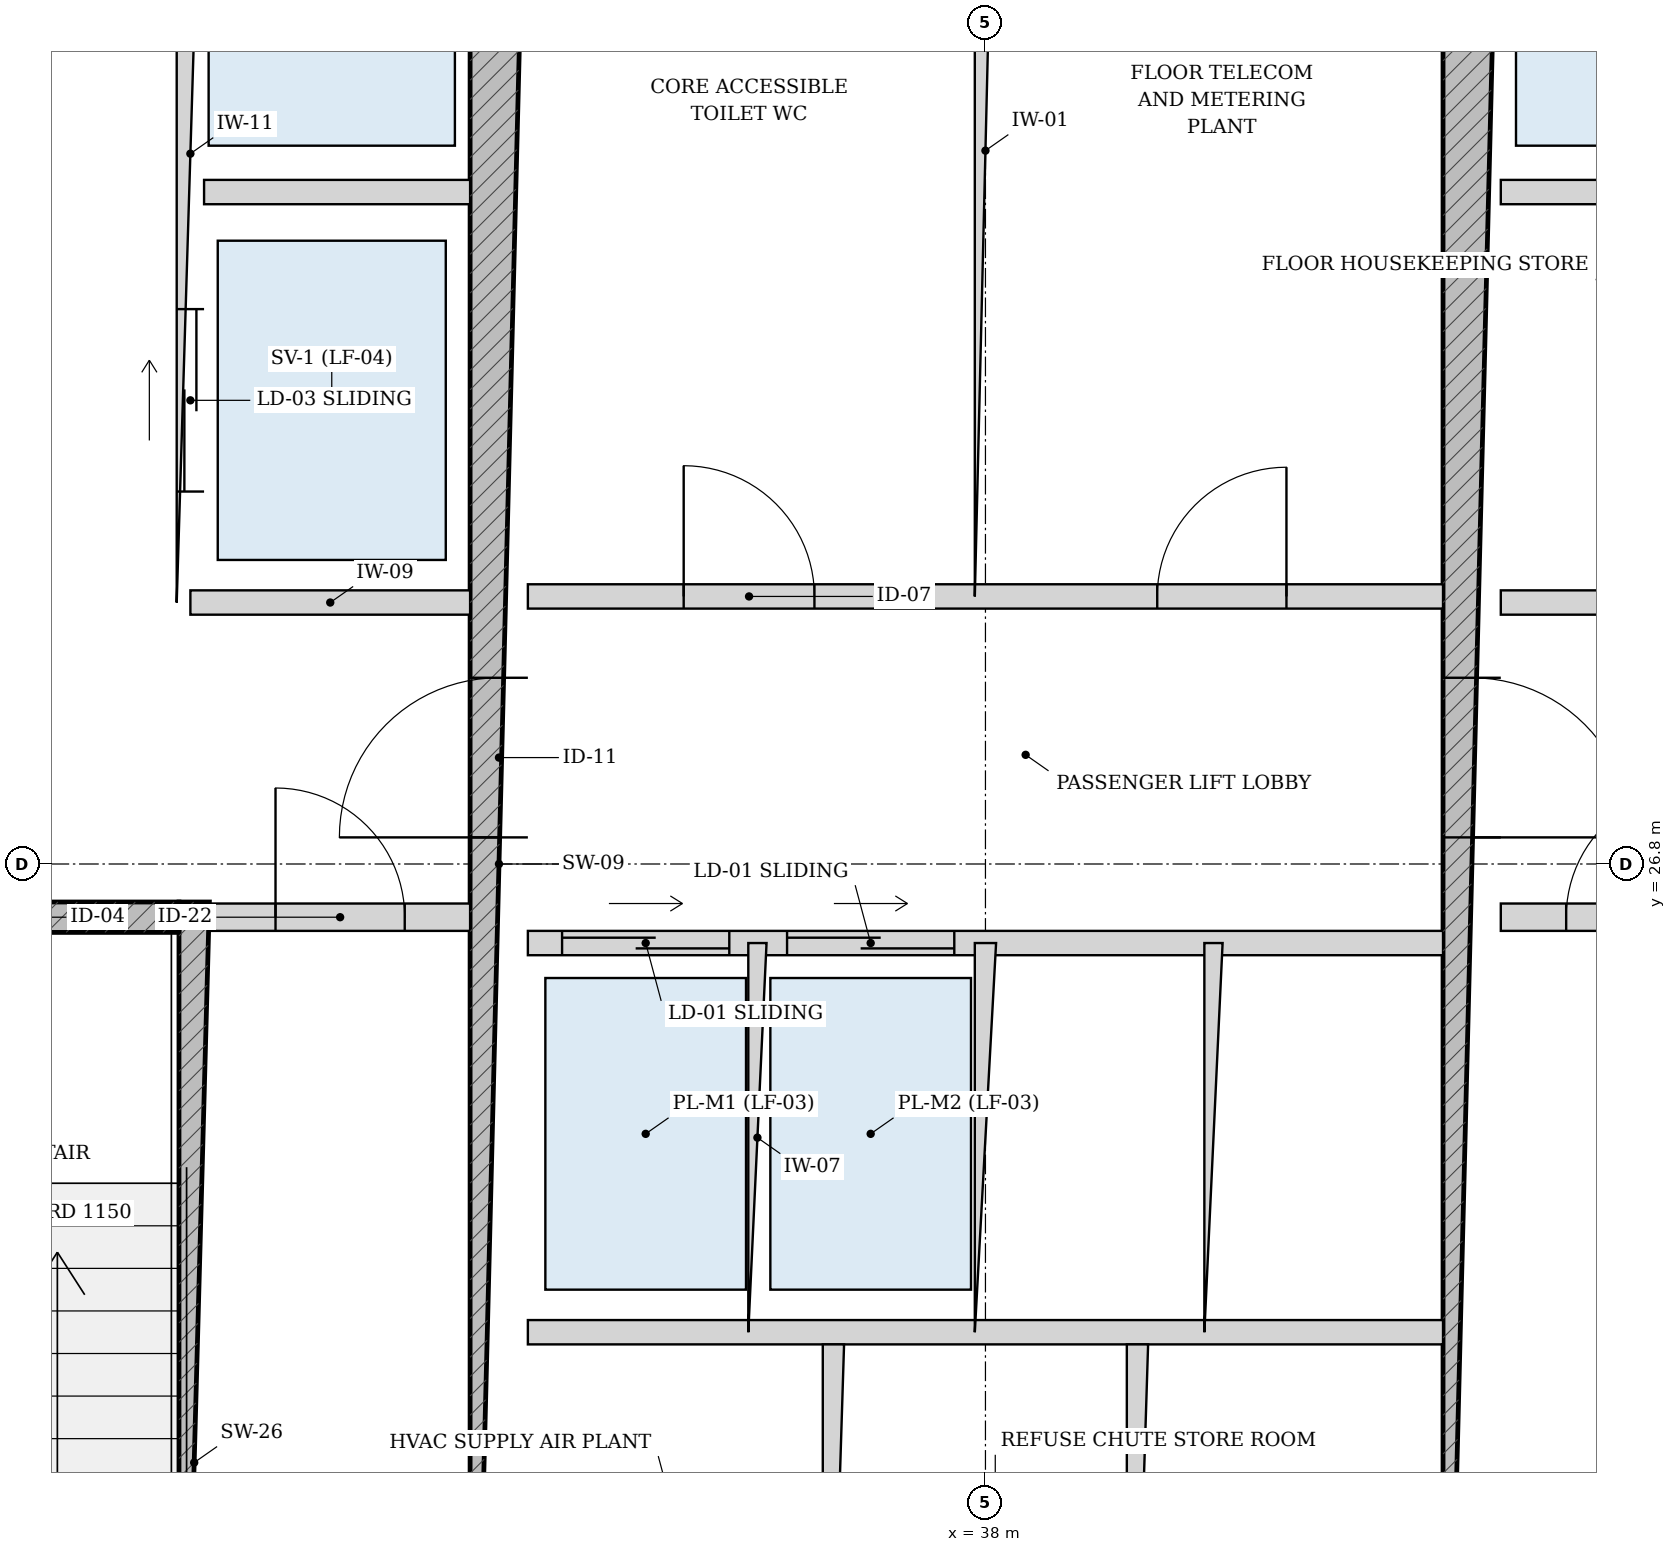
"""IFC4 building model, lengths in metres.
Left out: names, types, materials, properties, quantities, classifications, styles, units other than length and angle.
Written with IfcOpenShell. Run it as: python <this file> out.ifc"""

import sys

from ifc_helpers import new_model, si_unit, direction, frame, frame_2d, origin, place, context, subcontext, project, spatial, rectangle, extrude, source, transform, mapped, element, fill, save


model = new_model("IFC4")
c1 = context("Model", 3, precision=1e-05, world=origin(), true_north=direction((-0.2419218956, 0.970295726276)))
c2 = subcontext(c1, "Body", "Model", "MODEL_VIEW")
j1 = project(units=[si_unit("LENGTHUNIT", "METRE"), si_unit("PLANEANGLEUNIT", "RADIAN")], contexts=[c1])
p1 = place(None, origin())
s1 = spatial("IfcSite", under=j1, at=p1, CompositionType="ELEMENT")
p2 = place(p1, origin())
s2 = spatial("IfcBuilding", under=s1, at=p2, CompositionType="ELEMENT")
p3 = place(p2, frame((0.0, 0.0, 202.3)))
s3 = spatial("IfcBuildingStorey", under=s2, at=p3, CompositionType="ELEMENT", Elevation=202.3)
p4 = place(p3, frame((32.795, 19.175, 0.0), z_axis=(0.0, 0.0, 1.0), x_axis=(0.0, 1.0, 0.0)))
e1 = element("IfcWall", 1, at=p4, inside=s3, PredefinedType="SOLIDWALL", context=c2, shape_type="SweptSolid", body=[
    extrude(rectangle(XDim=7.375, YDim=0.2, at=frame_2d((3.688, 0.0))), origin(), (0.0, 0.0, 1.0), 3.435),
])
p5 = place(p3, frame((29.375, 26.45, 0.0), z_axis=(0.0, 0.0, 1.0), x_axis=(1.0, 0.0, 0.0)))
e2 = element("IfcWall", 2, at=p5, inside=s3, PredefinedType="SOLIDWALL", context=c2, shape_type="SweptSolid", body=[
    extrude(rectangle(XDim=3.32, YDim=0.2, at=frame_2d((1.66, 0.0))), origin(), (0.0, 0.0, 1.0), 3.435),
])
p6 = place(p5, frame((1.185, 0.0, 0.0)))
e3 = element("IfcOpeningElement", 3, at=p6, cuts=e2, PredefinedType="OPENING", context=c2, shape_type="SweptSolid", body=[
    extrude(rectangle(XDim=0.95, YDim=2.15, at=frame_2d((0.475, 1.075))), frame((0.0, 0.11, 0.0), z_axis=(0.0, -1.0, 0.0), x_axis=(1.0, 0.0, 0.0)), (0.0, 0.0, 1.0), 0.22),
])
p7 = place(p3, frame((34.8, 19.175, 0.0), z_axis=(0.0, 0.0, 1.0), x_axis=(0.0, 1.0, 0.0)))
e4 = element("IfcWall", 4, at=p7, inside=s3, PredefinedType="SHEAR", context=c2, shape_type="SweptSolid", body=[
    extrude(rectangle(XDim=15.25, YDim=0.38, at=frame_2d((7.625, 0.0))), origin(), (0.0, 0.0, 1.0), 3.435),
])
p8 = place(p7, frame((7.8, 0.0, 0.0)))
e5 = element("IfcOpeningElement", 5, at=p8, cuts=e4, PredefinedType="OPENING", context=c2, shape_type="SweptSolid", body=[
    extrude(rectangle(XDim=1.05, YDim=2.15, at=frame_2d((0.525, 1.075))), frame((0.0, 0.2, 0.0), z_axis=(0.0, -1.0, 0.0), x_axis=(1.0, 0.0, 0.0)), (0.0, 0.0, 1.0), 0.4),
])
p9 = place(p3, frame((41.2, 19.175, 0.0), z_axis=(0.0, 0.0, 1.0), x_axis=(0.0, 1.0, 0.0)))
e6 = element("IfcWall", 6, at=p9, inside=s3, PredefinedType="SHEAR", context=c2, shape_type="SweptSolid", body=[
    extrude(rectangle(XDim=15.25, YDim=0.38, at=frame_2d((7.625, 0.0))), origin(), (0.0, 0.0, 1.0), 3.435),
])
p10 = place(p9, frame((7.8, 0.0, 0.0)))
e7 = element("IfcOpeningElement", 7, at=p10, cuts=e6, PredefinedType="OPENING", context=c2, shape_type="SweptSolid", body=[
    extrude(rectangle(XDim=1.05, YDim=2.15, at=frame_2d((0.525, 1.075))), frame((0.0, 0.2, 0.0), z_axis=(0.0, -1.0, 0.0), x_axis=(1.0, 0.0, 0.0)), (0.0, 0.0, 1.0), 0.4),
])
p11 = place(p3, frame((32.9, 26.45, 0.0), z_axis=(0.0, 0.0, 1.0), x_axis=(1.0, 0.0, 0.0)))
e8 = element("IfcWall", 8, at=p11, inside=s3, PredefinedType="PARTITIONING", context=c2, shape_type="SweptSolid", body=[
    extrude(rectangle(XDim=1.71, YDim=0.18, at=frame_2d((0.855, 0.0))), origin(), (0.0, 0.0, 1.0), 3.435),
])
p12 = place(p11, frame((0.43, 0.0, 0.0)))
e9 = element("IfcOpeningElement", 9, at=p12, cuts=e8, PredefinedType="OPENING", context=c2, shape_type="SweptSolid", body=[
    extrude(rectangle(XDim=0.85, YDim=2.1, at=frame_2d((0.425, 1.05))), frame((0.0, 0.1, 0.0), z_axis=(0.0, -1.0, 0.0), x_axis=(1.0, 0.0, 0.0)), (0.0, 0.0, 1.0), 0.2),
])
p13 = place(p3, frame((41.39, 26.45, 0.0), z_axis=(0.0, 0.0, 1.0), x_axis=(1.0, 0.0, 0.0)))
e10 = element("IfcWall", 10, at=p13, inside=s3, PredefinedType="PARTITIONING", context=c2, shape_type="SweptSolid", body=[
    extrude(rectangle(XDim=1.71, YDim=0.18, at=frame_2d((0.855, 0.0))), origin(), (0.0, 0.0, 1.0), 3.435),
])
p14 = place(p13, frame((0.43, 0.0, 0.0)))
e11 = element("IfcOpeningElement", 11, at=p14, cuts=e10, PredefinedType="OPENING", context=c2, shape_type="SweptSolid", body=[
    extrude(rectangle(XDim=0.85, YDim=2.1, at=frame_2d((0.425, 1.05))), frame((0.0, 0.1, 0.0), z_axis=(0.0, -1.0, 0.0), x_axis=(1.0, 0.0, 0.0)), (0.0, 0.0, 1.0), 0.2),
])
p15 = place(p3, frame((32.77, 28.52, 0.0), z_axis=(0.0, 0.0, 1.0), x_axis=(0.0, 1.0, 0.0)))
e12 = element("IfcWall", 12, at=p15, inside=s3, PredefinedType="PARTITIONING", context=c2, shape_type="SweptSolid", body=[
    extrude(rectangle(XDim=5.905, YDim=0.18, at=frame_2d((2.953, 0.0))), origin(), (0.0, 0.0, 1.0), 3.435),
])
p16 = place(p15, frame((3.655, 0.0, 0.0)))
e13 = element("IfcOpeningElement", 13, at=p16, cuts=e12, PredefinedType="OPENING", context=c2, shape_type="SweptSolid", body=[
    extrude(rectangle(XDim=1.15, YDim=2.2, at=frame_2d((0.575, 1.1))), frame((0.0, 0.1, 0.0), z_axis=(0.0, -1.0, 0.0), x_axis=(1.0, 0.0, 0.0)), (0.0, 0.0, 1.0), 0.2),
])
p17 = place(p15, frame((0.73, 0.0, 0.0)))
e14 = element("IfcOpeningElement", 14, at=p17, cuts=e12, PredefinedType="OPENING", context=c2, shape_type="SweptSolid", body=[
    extrude(rectangle(XDim=1.2, YDim=2.25, at=frame_2d((0.6, 1.125))), frame((0.0, 0.1, 0.0), z_axis=(0.0, -1.0, 0.0), x_axis=(1.0, 0.0, 0.0)), (0.0, 0.0, 1.0), 0.2),
])
p18 = place(p3, frame((32.86, 31.22, 0.0), z_axis=(0.0, 0.0, 1.0), x_axis=(1.0, 0.0, 0.0)))
e15 = element("IfcWall", 15, at=p18, inside=s3, PredefinedType="PARTITIONING", context=c2, shape_type="SweptSolid", body=[
    extrude(rectangle(XDim=1.75, YDim=0.16, at=frame_2d((0.875, 0.0))), origin(), (0.0, 0.0, 1.0), 3.435),
])
p19 = place(p3, frame((32.77, 28.52, 0.0), z_axis=(0.0, 0.0, 1.0), x_axis=(1.0, 0.0, 0.0)))
e16 = element("IfcWall", 16, at=p19, inside=s3, PredefinedType="PARTITIONING", context=c2, shape_type="SweptSolid", body=[
    extrude(rectangle(XDim=1.84, YDim=0.16, at=frame_2d((0.92, 0.0))), origin(), (0.0, 0.0, 1.0), 3.435),
])
p20 = place(p3, frame((41.39, 31.22, 0.0), z_axis=(0.0, 0.0, 1.0), x_axis=(1.0, 0.0, 0.0)))
e17 = element("IfcWall", 17, at=p20, inside=s3, PredefinedType="PARTITIONING", context=c2, shape_type="SweptSolid", body=[
    extrude(rectangle(XDim=1.75, YDim=0.16, at=frame_2d((0.875, 0.0))), origin(), (0.0, 0.0, 1.0), 3.435),
])
p21 = place(p3, frame((41.39, 28.52, 0.0), z_axis=(0.0, 0.0, 1.0), x_axis=(1.0, 0.0, 0.0)))
e18 = element("IfcWall", 18, at=p21, inside=s3, PredefinedType="PARTITIONING", context=c2, shape_type="SweptSolid", body=[
    extrude(rectangle(XDim=1.84, YDim=0.16, at=frame_2d((0.92, 0.0))), origin(), (0.0, 0.0, 1.0), 3.435),
])
p22 = place(p3, frame((34.99, 28.56, 0.0), z_axis=(0.0, 0.0, 1.0), x_axis=(1.0, 0.0, 0.0)))
e19 = element("IfcWall", 19, at=p22, inside=s3, PredefinedType="PARTITIONING", context=c2, shape_type="SweptSolid", body=[
    extrude(rectangle(XDim=6.02, YDim=0.16, at=frame_2d((3.01, 0.0))), origin(), (0.0, 0.0, 1.0), 3.435),
])
p23 = place(p22, frame((1.025, 0.0, 0.0)))
e20 = element("IfcOpeningElement", 20, at=p23, cuts=e19, PredefinedType="OPENING", context=c2, shape_type="SweptSolid", body=[
    extrude(rectangle(XDim=0.86, YDim=2.1, at=frame_2d((0.43, 1.05))), frame((0.0, 0.09, 0.0), z_axis=(0.0, -1.0, 0.0), x_axis=(1.0, 0.0, 0.0)), (0.0, 0.0, 1.0), 0.18),
])
p24 = place(p22, frame((4.14, 0.0, 0.0)))
e21 = element("IfcOpeningElement", 21, at=p24, cuts=e19, PredefinedType="OPENING", context=c2, shape_type="SweptSolid", body=[
    extrude(rectangle(XDim=0.85, YDim=2.1, at=frame_2d((0.425, 1.05))), frame((0.0, 0.09, 0.0), z_axis=(0.0, -1.0, 0.0), x_axis=(1.0, 0.0, 0.0)), (0.0, 0.0, 1.0), 0.18),
])
p25 = place(p3, frame((38.0, 28.56, 0.0), z_axis=(0.0, 0.0, 1.0), x_axis=(0.0, 1.0, 0.0)))
e22 = element("IfcWall", 22, at=p25, inside=s3, PredefinedType="PARTITIONING", context=c2, shape_type="SweptSolid", body=[
    extrude(rectangle(XDim=5.865, YDim=0.14, at=frame_2d((2.933, 0.0))), origin(), (0.0, 0.0, 1.0), 3.435),
])
p26 = place(p3, frame((34.99, 26.28, 0.0), z_axis=(0.0, 0.0, 1.0), x_axis=(1.0, 0.0, 0.0)))
e23 = element("IfcWall", 23, at=p26, inside=s3, PredefinedType="PARTITIONING", context=c2, shape_type="SweptSolid", body=[
    extrude(rectangle(XDim=6.02, YDim=0.16, at=frame_2d((3.01, 0.0))), origin(), (0.0, 0.0, 1.0), 3.435),
])
p27 = place(p26, frame((0.225, 0.0, 0.0)))
e24 = element("IfcOpeningElement", 24, at=p27, cuts=e23, PredefinedType="OPENING", context=c2, shape_type="SweptSolid", body=[
    extrude(rectangle(XDim=1.1, YDim=2.2, at=frame_2d((0.55, 1.1))), frame((0.0, 0.09, 0.0), z_axis=(0.0, -1.0, 0.0), x_axis=(1.0, 0.0, 0.0)), (0.0, 0.0, 1.0), 0.18),
])
p28 = place(p26, frame((1.705, 0.0, 0.0)))
e25 = element("IfcOpeningElement", 25, at=p28, cuts=e23, PredefinedType="OPENING", context=c2, shape_type="SweptSolid", body=[
    extrude(rectangle(XDim=1.1, YDim=2.2, at=frame_2d((0.55, 1.1))), frame((0.0, 0.09, 0.0), z_axis=(0.0, -1.0, 0.0), x_axis=(1.0, 0.0, 0.0)), (0.0, 0.0, 1.0), 0.18),
])
p29 = place(p3, frame((34.99, 23.72, 0.0), z_axis=(0.0, 0.0, 1.0), x_axis=(1.0, 0.0, 0.0)))
e26 = element("IfcWall", 26, at=p29, inside=s3, PredefinedType="PARTITIONING", context=c2, shape_type="SweptSolid", body=[
    extrude(rectangle(XDim=6.02, YDim=0.16, at=frame_2d((3.01, 0.0))), origin(), (0.0, 0.0, 1.0), 3.435),
])
p30 = place(p3, frame((36.5, 23.72, 0.0), z_axis=(0.0, 0.0, 1.0), x_axis=(0.0, 1.0, 0.0)))
e27 = element("IfcWall", 27, at=p30, inside=s3, PredefinedType="PARTITIONING", context=c2, shape_type="SweptSolid", body=[
    extrude(rectangle(XDim=2.56, YDim=0.12, at=frame_2d((1.28, 0.0))), origin(), (0.0, 0.0, 1.0), 3.435),
])
p31 = place(p3, frame((38.0, 23.72, 0.0), z_axis=(0.0, 0.0, 1.0), x_axis=(0.0, 1.0, 0.0)))
e28 = element("IfcWall", 28, at=p31, inside=s3, PredefinedType="PARTITIONING", context=c2, shape_type="SweptSolid", body=[
    extrude(rectangle(XDim=2.56, YDim=0.14, at=frame_2d((1.28, 0.0))), origin(), (0.0, 0.0, 1.0), 3.435),
])
p32 = place(p3, frame((39.5, 23.72, 0.0), z_axis=(0.0, 0.0, 1.0), x_axis=(0.0, 1.0, 0.0)))
e29 = element("IfcWall", 29, at=p32, inside=s3, PredefinedType="PARTITIONING", context=c2, shape_type="SweptSolid", body=[
    extrude(rectangle(XDim=2.56, YDim=0.12, at=frame_2d((1.28, 0.0))), origin(), (0.0, 0.0, 1.0), 3.435),
])
p33 = place(p3, frame((37.0, 19.175, 0.0), z_axis=(0.0, 0.0, 1.0), x_axis=(0.0, 1.0, 0.0)))
e30 = element("IfcWall", 30, at=p33, inside=s3, PredefinedType="PARTITIONING", context=c2, shape_type="SweptSolid", body=[
    extrude(rectangle(XDim=4.465, YDim=0.14, at=frame_2d((2.232, 0.0))), origin(), (0.0, 0.0, 1.0), 3.435),
])
p34 = place(p33, frame((1.808, 0.0, 0.0)))
e31 = element("IfcOpeningElement", 31, at=p34, cuts=e30, PredefinedType="OPENING", context=c2, shape_type="SweptSolid", body=[
    extrude(rectangle(XDim=0.85, YDim=2.1, at=frame_2d((0.425, 1.05))), frame((0.0, 0.08, 0.0), z_axis=(0.0, -1.0, 0.0), x_axis=(1.0, 0.0, 0.0)), (0.0, 0.0, 1.0), 0.16),
])
p35 = place(p3, frame((39.0, 19.175, 0.0), z_axis=(0.0, 0.0, 1.0), x_axis=(0.0, 1.0, 0.0)))
e32 = element("IfcWall", 32, at=p35, inside=s3, PredefinedType="PARTITIONING", context=c2, shape_type="SweptSolid", body=[
    extrude(rectangle(XDim=4.465, YDim=0.14, at=frame_2d((2.232, 0.0))), origin(), (0.0, 0.0, 1.0), 3.435),
])
p36 = place(p35, frame((1.808, 0.0, 0.0)))
e33 = element("IfcOpeningElement", 33, at=p36, cuts=e32, PredefinedType="OPENING", context=c2, shape_type="SweptSolid", body=[
    extrude(rectangle(XDim=0.85, YDim=2.1, at=frame_2d((0.425, 1.05))), frame((0.0, 0.08, 0.0), z_axis=(0.0, -1.0, 0.0), x_axis=(1.0, 0.0, 0.0)), (0.0, 0.0, 1.0), 0.16),
])
m1 = source(origin(), c2, "Body", "SweptSolid", [
    extrude(rectangle(XDim=1.05, YDim=2.15, at=frame_2d((0.525, 1.075))), frame((0.0, 0.025, 0.0), z_axis=(0.0, -1.0, 0.0), x_axis=(1.0, 0.0, 0.0)), (0.0, 0.0, 1.0), 0.05),
])
p37 = place(p8, origin())
e34 = element("IfcDoor", 34, at=p37, inside=s3, OperationType="SINGLE_SWING_LEFT", PredefinedType="DOOR", context=c2, shape_type="MappedRepresentation", body=[
    mapped(m1, transform((0.0, 0.0, 0.0), scale=1.0)),
])
fill(e5, e34)
p38 = place(p10, frame((1.05, 0.0, 0.0), z_axis=(0.0, 0.0, 1.0), x_axis=(-1.0, 0.0, 0.0)))
e35 = element("IfcDoor", 35, at=p38, inside=s3, OperationType="SINGLE_SWING_RIGHT", PredefinedType="DOOR", context=c2, shape_type="MappedRepresentation", body=[
    mapped(m1, transform((0.0, 0.0, 0.0), scale=1.0)),
])
fill(e7, e35)
m2 = source(origin(), c2, "Body", "SweptSolid", [
    extrude(rectangle(XDim=0.85, YDim=2.1, at=frame_2d((0.425, 1.05))), frame((0.0, 0.025, 0.0), z_axis=(0.0, -1.0, 0.0), x_axis=(1.0, 0.0, 0.0)), (0.0, 0.0, 1.0), 0.05),
])
p39 = place(p12, origin())
e36 = element("IfcDoor", 36, at=p39, inside=s3, OperationType="SINGLE_SWING_LEFT", PredefinedType="DOOR", context=c2, shape_type="MappedRepresentation", body=[
    mapped(m2, transform((0.0, 0.0, 0.0), scale=1.0)),
])
fill(e9, e36)
p40 = place(p14, origin())
e37 = element("IfcDoor", 37, at=p40, inside=s3, OperationType="SINGLE_SWING_RIGHT", PredefinedType="DOOR", context=c2, shape_type="MappedRepresentation", body=[
    mapped(m2, transform((0.0, 0.0, 0.0), scale=1.0)),
])
fill(e11, e37)
m3 = source(origin(), c2, "Body", "SweptSolid", [
    extrude(rectangle(XDim=0.86, YDim=2.1, at=frame_2d((0.43, 1.05))), frame((0.0, 0.025, 0.0), z_axis=(0.0, -1.0, 0.0), x_axis=(1.0, 0.0, 0.0)), (0.0, 0.0, 1.0), 0.05),
])
p41 = place(p23, origin())
e38 = element("IfcDoor", 38, at=p41, inside=s3, OperationType="SINGLE_SWING_LEFT", PredefinedType="DOOR", context=c2, shape_type="MappedRepresentation", body=[
    mapped(m3, transform((0.0, 0.0, 0.0), scale=1.0)),
])
fill(e20, e38)
p42 = place(p24, origin())
e39 = element("IfcDoor", 39, at=p42, inside=s3, OperationType="SINGLE_SWING_RIGHT", PredefinedType="DOOR", context=c2, shape_type="MappedRepresentation", body=[
    mapped(m2, transform((0.0, 0.0, 0.0), scale=1.0)),
])
fill(e21, e39)
m4 = source(origin(), c2, "Body", "SweptSolid", [
    extrude(rectangle(XDim=1.2, YDim=2.25, at=frame_2d((0.6, 1.125))), frame((0.0, 0.025, 0.0), z_axis=(0.0, -1.0, 0.0), x_axis=(1.0, 0.0, 0.0)), (0.0, 0.0, 1.0), 0.05),
])
p43 = place(p17, origin())
e40 = element("IfcDoor", 40, at=p43, inside=s3, OperationType="DOUBLE_DOOR_SLIDING", PredefinedType="DOOR", context=c2, shape_type="MappedRepresentation", body=[
    mapped(m4, transform((0.0, 0.0, 0.0), scale=1.0)),
])
fill(e14, e40)
m5 = source(origin(), c2, "Body", "SweptSolid", [
    extrude(rectangle(XDim=1.1, YDim=2.2, at=frame_2d((0.55, 1.1))), frame((0.0, 0.025, 0.0), z_axis=(0.0, -1.0, 0.0), x_axis=(1.0, 0.0, 0.0)), (0.0, 0.0, 1.0), 0.05),
])
p44 = place(p27, origin())
e41 = element("IfcDoor", 41, at=p44, inside=s3, OperationType="DOUBLE_DOOR_SLIDING", PredefinedType="DOOR", context=c2, shape_type="MappedRepresentation", body=[
    mapped(m5, transform((0.0, 0.0, 0.0), scale=1.0)),
])
fill(e24, e41)
p45 = place(p28, origin())
e42 = element("IfcDoor", 42, at=p45, inside=s3, OperationType="DOUBLE_DOOR_SLIDING", PredefinedType="DOOR", context=c2, shape_type="MappedRepresentation", body=[
    mapped(m5, transform((0.0, 0.0, 0.0), scale=1.0)),
])
fill(e25, e42)
save(model, sys.argv[1])
